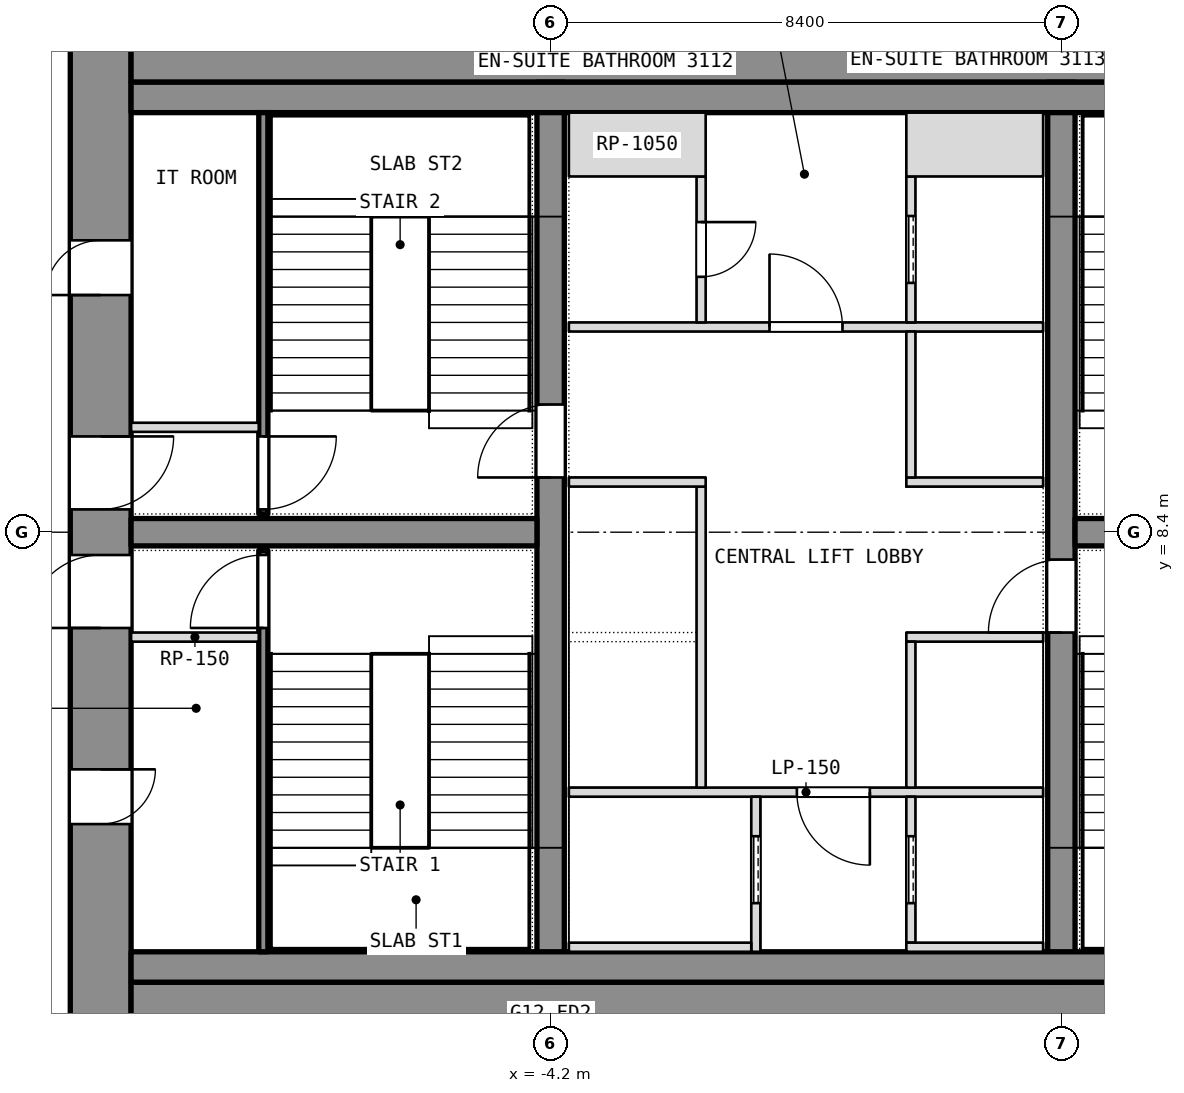
"""IFC4 building model, lengths in metres.
Left out: names, types, materials, properties, quantities, classifications, styles, units other than length and angle.
Written with IfcOpenShell. Run it as: python <this file> out.ifc"""

import sys

from ifc_helpers import new_model, si_unit, direction, frame, frame_2d, origin, place, context, subcontext, project, spatial, rectangle, extrude, element, fill, save


model = new_model("IFC4")
c1 = context("Model", 3, precision=1e-05, world=origin(), true_north=direction((0.0, 1.0)))
c2 = subcontext(c1, "Body", "Model", "MODEL_VIEW")
j1 = project(units=[si_unit("LENGTHUNIT", "METRE"), si_unit("PLANEANGLEUNIT", "RADIAN")], contexts=[c1])
p1 = place(None, origin())
s1 = spatial("IfcSite", under=j1, at=p1, CompositionType="ELEMENT")
p2 = place(p1, origin())
s2 = spatial("IfcBuilding", under=s1, at=p2, CompositionType="ELEMENT")
p3 = place(p2, frame((0.0, 0.0, 137.3)))
s3 = spatial("IfcBuildingStorey", under=s2, at=p3, CompositionType="ELEMENT", Elevation=137.3)
p4 = place(p3, frame((-11.6, 0.0, 0.0), z_axis=(0.0, 0.0, 1.0), x_axis=(0.0, 1.0, 0.0)))
e1 = element("IfcWall", 1, at=p4, inside=s3, PredefinedType="SHEAR", context=c2, shape_type="SweptSolid", body=[
    extrude(rectangle(XDim=16.8, YDim=1.0, at=frame_2d((8.4, 0.0))), origin(), (0.0, 0.0, 1.0), 3.6),
])
p5 = place(p4, frame((3.6, 0.0, 0.0)))
e2 = element("IfcOpeningElement", 2, at=p5, cuts=e1, PredefinedType="OPENING", context=c2, shape_type="SweptSolid", body=[
    extrude(rectangle(XDim=0.9, YDim=2.1, at=frame_2d((0.45, 1.05))), frame((0.0, 0.5, 0.0), z_axis=(0.0, -1.0, 0.0), x_axis=(1.0, 0.0, 0.0)), (0.0, 0.0, 1.0), 1.0),
])
p6 = place(p4, frame((6.825, 0.0, 0.0)))
e3 = element("IfcOpeningElement", 3, at=p6, cuts=e1, PredefinedType="OPENING", context=c2, shape_type="SweptSolid", body=[
    extrude(rectangle(XDim=1.2, YDim=2.1, at=frame_2d((0.6, 1.05))), frame((0.0, 0.5, 0.0), z_axis=(0.0, -1.0, 0.0), x_axis=(1.0, 0.0, 0.0)), (0.0, 0.0, 1.0), 1.0),
])
p7 = place(p4, frame((12.3, 0.0, 0.0)))
e4 = element("IfcOpeningElement", 4, at=p7, cuts=e1, PredefinedType="OPENING", context=c2, shape_type="SweptSolid", body=[
    extrude(rectangle(XDim=0.9, YDim=2.1, at=frame_2d((0.45, 1.05))), frame((0.0, 0.5, 0.0), z_axis=(0.0, -1.0, 0.0), x_axis=(1.0, 0.0, 0.0)), (0.0, 0.0, 1.0), 1.0),
])
p8 = place(p4, frame((8.775, 0.0, 0.0)))
e5 = element("IfcOpeningElement", 5, at=p8, cuts=e1, PredefinedType="OPENING", context=c2, shape_type="SweptSolid", body=[
    extrude(rectangle(XDim=1.2, YDim=2.1, at=frame_2d((0.6, 1.05))), frame((0.0, 0.5, 0.0), z_axis=(0.0, -1.0, 0.0), x_axis=(1.0, 0.0, 0.0)), (0.0, 0.0, 1.0), 1.0),
])
for number, where, z_axis, x_axis in (
    (6, (-11.1, 0.5, 0.0), (0.0, 0.0, 1.0), (1.0, 0.0, 0.0)),
    (7, (-11.1, 16.3, 0.0), (0.0, 0.0, 1.0), (1.0, 0.0, 0.0)),
):
    element("IfcWall", number, at=place(p3, frame(where, z_axis=z_axis, x_axis=x_axis)), inside=s3, PredefinedType="SHEAR", context=c2, shape_type="SweptSolid", body=[
        extrude(rectangle(XDim=22.2, YDim=1.0, at=frame_2d((11.1, 0.0))), origin(), (0.0, 0.0, 1.0), 3.6),
    ])
p9 = place(p3, frame((-4.2, 1.0, 0.0), z_axis=(0.0, 0.0, 1.0), x_axis=(0.0, 1.0, 0.0)))
e8 = element("IfcWall", 8, at=p9, inside=s3, PredefinedType="SHEAR", context=c2, shape_type="SweptSolid", body=[
    extrude(rectangle(XDim=14.8, YDim=0.45, at=frame_2d((7.4, 0.0))), origin(), (0.0, 0.0, 1.0), 3.6),
])
p10 = place(p9, frame((8.3, 0.0, 0.0)))
e9 = element("IfcOpeningElement", 9, at=p10, cuts=e8, PredefinedType="OPENING", context=c2, shape_type="SweptSolid", body=[
    extrude(rectangle(XDim=1.2, YDim=2.1, at=frame_2d((0.6, 1.05))), frame((0.0, 0.225, 0.0), z_axis=(0.0, -1.0, 0.0), x_axis=(1.0, 0.0, 0.0)), (0.0, 0.0, 1.0), 0.45),
])
p11 = place(p3, frame((4.2, 1.0, 0.0), z_axis=(0.0, 0.0, 1.0), x_axis=(0.0, 1.0, 0.0)))
e10 = element("IfcWall", 10, at=p11, inside=s3, PredefinedType="SHEAR", context=c2, shape_type="SweptSolid", body=[
    extrude(rectangle(XDim=14.8, YDim=0.45, at=frame_2d((7.4, 0.0))), origin(), (0.0, 0.0, 1.0), 3.6),
])
p12 = place(p11, frame((5.75, 0.0, 0.0)))
e11 = element("IfcOpeningElement", 11, at=p12, cuts=e10, PredefinedType="OPENING", context=c2, shape_type="SweptSolid", body=[
    extrude(rectangle(XDim=1.2, YDim=2.1, at=frame_2d((0.6, 1.05))), frame((0.0, 0.225, 0.0), z_axis=(0.0, -1.0, 0.0), x_axis=(1.0, 0.0, 0.0)), (0.0, 0.0, 1.0), 0.45),
])
for number, where, z_axis, x_axis in (
    (12, (-11.1, 8.4, 0.0), (0.0, 0.0, 1.0), (1.0, 0.0, 0.0)),
    (13, (4.425, 8.4, 0.0), (0.0, 0.0, 1.0), (1.0, 0.0, 0.0)),
):
    element("IfcWall", number, at=place(p3, frame(where, z_axis=z_axis, x_axis=x_axis)), inside=s3, PredefinedType="SHEAR", context=c2, shape_type="SweptSolid", body=[
        extrude(rectangle(XDim=6.675, YDim=0.45, at=frame_2d((3.337, 0.0))), origin(), (0.0, 0.0, 1.0), 3.6),
    ])
for number, where, z_axis, x_axis in (
    (14, (-11.1, 1.25, 0.0), (0.0, 0.0, 1.0), (1.0, 0.0, 0.0)),
    (15, (-11.1, 15.55, 0.0), (0.0, 0.0, 1.0), (1.0, 0.0, 0.0)),
):
    element("IfcWall", number, at=place(p3, frame(where, z_axis=z_axis, x_axis=x_axis)), inside=s3, PredefinedType="PARTITIONING", context=c2, shape_type="SweptSolid", body=[
        extrude(rectangle(XDim=22.2, YDim=0.5, at=frame_2d((11.1, 0.0))), origin(), (0.0, 0.0, 1.0), 3.34),
    ])
p13 = place(p3, frame((-8.925, 1.5, 0.0), z_axis=(0.0, 0.0, 1.0), x_axis=(0.0, 1.0, 0.0)))
e16 = element("IfcWall", 16, at=p13, inside=s3, PredefinedType="SHEAR", context=c2, shape_type="SweptSolid", body=[
    extrude(rectangle(XDim=6.6, YDim=0.15, at=frame_2d((3.3, 0.0))), origin(), (0.0, 0.0, 1.0), 3.34),
])
p14 = place(p13, frame((5.325, 0.0, 0.0)))
e17 = element("IfcOpeningElement", 17, at=p14, cuts=e16, PredefinedType="OPENING", context=c2, shape_type="SweptSolid", body=[
    extrude(rectangle(XDim=1.2, YDim=2.1, at=frame_2d((0.6, 1.05))), frame((0.0, 0.075, 0.0), z_axis=(0.0, -1.0, 0.0), x_axis=(1.0, 0.0, 0.0)), (0.0, 0.0, 1.0), 0.15),
])
p15 = place(p3, frame((-11.1, 6.675, 0.0), z_axis=(0.0, 0.0, 1.0), x_axis=(1.0, 0.0, 0.0)))
e18 = element("IfcWall", 18, at=p15, inside=s3, PredefinedType="PARTITIONING", context=c2, shape_type="SweptSolid", body=[
    extrude(rectangle(XDim=2.1, YDim=0.15, at=frame_2d((1.05, 0.0))), origin(), (0.0, 0.0, 1.0), 3.34),
])
p16 = place(p3, frame((-8.925, 8.7, 0.0), z_axis=(0.0, 0.0, 1.0), x_axis=(0.0, 1.0, 0.0)))
e19 = element("IfcWall", 19, at=p16, inside=s3, PredefinedType="SHEAR", context=c2, shape_type="SweptSolid", body=[
    extrude(rectangle(XDim=6.6, YDim=0.15, at=frame_2d((3.3, 0.0))), origin(), (0.0, 0.0, 1.0), 3.34),
])
p17 = place(p16, frame((0.075, 0.0, 0.0)))
e20 = element("IfcOpeningElement", 20, at=p17, cuts=e19, PredefinedType="OPENING", context=c2, shape_type="SweptSolid", body=[
    extrude(rectangle(XDim=1.2, YDim=2.1, at=frame_2d((0.6, 1.05))), frame((0.0, 0.075, 0.0), z_axis=(0.0, -1.0, 0.0), x_axis=(1.0, 0.0, 0.0)), (0.0, 0.0, 1.0), 0.15),
])
p18 = place(p3, frame((-11.1, 10.125, 0.0), z_axis=(0.0, 0.0, 1.0), x_axis=(1.0, 0.0, 0.0)))
e21 = element("IfcWall", 21, at=p18, inside=s3, PredefinedType="PARTITIONING", context=c2, shape_type="SweptSolid", body=[
    extrude(rectangle(XDim=2.1, YDim=0.15, at=frame_2d((1.05, 0.0))), origin(), (0.0, 0.0, 1.0), 3.34),
])
p19 = place(p3, frame((-3.9, 4.125, 0.0), z_axis=(0.0, 0.0, 1.0), x_axis=(1.0, 0.0, 0.0)))
e22 = element("IfcWall", 22, at=p19, inside=s3, PredefinedType="PARTITIONING", context=c2, shape_type="SweptSolid", body=[
    extrude(rectangle(XDim=7.8, YDim=0.15, at=frame_2d((3.9, 0.0))), origin(), (0.0, 0.0, 1.0), 3.34),
])
p20 = place(p19, frame((3.75, 0.0, 0.0)))
e23 = element("IfcOpeningElement", 23, at=p20, cuts=e22, PredefinedType="OPENING", context=c2, shape_type="SweptSolid", body=[
    extrude(rectangle(XDim=1.2, YDim=2.1, at=frame_2d((0.6, 1.05))), frame((0.0, 0.075, 0.0), z_axis=(0.0, -1.0, 0.0), x_axis=(1.0, 0.0, 0.0)), (0.0, 0.0, 1.0), 0.15),
])
p21 = place(p3, frame((-3.9, 11.775, 0.0), z_axis=(0.0, 0.0, 1.0), x_axis=(1.0, 0.0, 0.0)))
e24 = element("IfcWall", 24, at=p21, inside=s3, PredefinedType="PARTITIONING", context=c2, shape_type="SweptSolid", body=[
    extrude(rectangle(XDim=7.8, YDim=0.15, at=frame_2d((3.9, 0.0))), origin(), (0.0, 0.0, 1.0), 3.34),
])
p22 = place(p21, frame((3.3, 0.0, 0.0)))
e25 = element("IfcOpeningElement", 25, at=p22, cuts=e24, PredefinedType="OPENING", context=c2, shape_type="SweptSolid", body=[
    extrude(rectangle(XDim=1.2, YDim=2.1, at=frame_2d((0.6, 1.05))), frame((0.0, 0.075, 0.0), z_axis=(0.0, -1.0, 0.0), x_axis=(1.0, 0.0, 0.0)), (0.0, 0.0, 1.0), 0.15),
])
p23 = place(p3, frame((-0.825, 1.5, 0.0), z_axis=(0.0, 0.0, 1.0), x_axis=(0.0, 1.0, 0.0)))
e26 = element("IfcWall", 26, at=p23, inside=s3, PredefinedType="SHEAR", context=c2, shape_type="SweptSolid", body=[
    extrude(rectangle(XDim=2.55, YDim=0.15, at=frame_2d((1.275, 0.0))), origin(), (0.0, 0.0, 1.0), 3.6),
])
p24 = place(p23, frame((0.8, 0.0, 0.0)))
e27 = element("IfcOpeningElement", 27, at=p24, cuts=e26, PredefinedType="OPENING", context=c2, shape_type="SweptSolid", body=[
    extrude(rectangle(XDim=1.1, YDim=2.1, at=frame_2d((0.55, 1.05))), frame((0.0, 0.075, 0.0), z_axis=(0.0, -1.0, 0.0), x_axis=(1.0, 0.0, 0.0)), (0.0, 0.0, 1.0), 0.15),
])
p25 = place(p3, frame((-3.9, 1.575, 0.0), z_axis=(0.0, 0.0, 1.0), x_axis=(1.0, 0.0, 0.0)))
e28 = element("IfcWall", 28, at=p25, inside=s3, PredefinedType="SHEAR", context=c2, shape_type="SweptSolid", body=[
    extrude(rectangle(XDim=3.0, YDim=0.15, at=frame_2d((1.5, 0.0))), origin(), (0.0, 0.0, 1.0), 3.6),
])
p26 = place(p3, frame((-1.725, 4.2, 0.0), z_axis=(0.0, 0.0, 1.0), x_axis=(0.0, 1.0, 0.0)))
e29 = element("IfcWall", 29, at=p26, inside=s3, PredefinedType="SHEAR", context=c2, shape_type="SweptSolid", body=[
    extrude(rectangle(XDim=4.95, YDim=0.15, at=frame_2d((2.475, 0.0))), origin(), (0.0, 0.0, 1.0), 3.6),
])
p27 = place(p3, frame((-3.9, 9.225, 0.0), z_axis=(0.0, 0.0, 1.0), x_axis=(1.0, 0.0, 0.0)))
e30 = element("IfcWall", 30, at=p27, inside=s3, PredefinedType="SHEAR", context=c2, shape_type="SweptSolid", body=[
    extrude(rectangle(XDim=2.25, YDim=0.15, at=frame_2d((1.125, 0.0))), origin(), (0.0, 0.0, 1.0), 3.6),
])
p28 = place(p3, frame((-1.725, 11.85, 0.0), z_axis=(0.0, 0.0, 1.0), x_axis=(0.0, 1.0, 0.0)))
e31 = element("IfcWall", 31, at=p28, inside=s3, PredefinedType="PARTITIONING", context=c2, shape_type="SweptSolid", body=[
    extrude(rectangle(XDim=2.4, YDim=0.15, at=frame_2d((1.2, 0.0))), origin(), (0.0, 0.0, 1.0), 3.34),
])
p29 = place(p28, frame((0.75, 0.0, 0.0)))
e32 = element("IfcOpeningElement", 32, at=p29, cuts=e31, PredefinedType="OPENING", context=c2, shape_type="SweptSolid", body=[
    extrude(rectangle(XDim=0.9, YDim=2.1, at=frame_2d((0.45, 1.05))), frame((0.0, 0.075, 0.0), z_axis=(0.0, -1.0, 0.0), x_axis=(1.0, 0.0, 0.0)), (0.0, 0.0, 1.0), 0.15),
])
p30 = place(p3, frame((-3.9, 14.775, 0.0), z_axis=(0.0, 0.0, 1.0), x_axis=(1.0, 0.0, 0.0)))
e33 = element("IfcWall", 33, at=p30, inside=s3, PredefinedType="PARTITIONING", context=c2, shape_type="SweptSolid", body=[
    extrude(rectangle(XDim=2.25, YDim=1.05, at=frame_2d((1.125, 0.0))), origin(), (0.0, 0.0, 1.0), 3.34),
])
p31 = place(p3, frame((1.725, 1.65, 0.0), z_axis=(0.0, 0.0, 1.0), x_axis=(0.0, 1.0, 0.0)))
e34 = element("IfcWall", 34, at=p31, inside=s3, PredefinedType="SHEAR", context=c2, shape_type="SweptSolid", body=[
    extrude(rectangle(XDim=2.4, YDim=0.15, at=frame_2d((1.2, 0.0))), origin(), (0.0, 0.0, 1.0), 3.6),
])
p32 = place(p31, frame((0.65, 0.0, 0.0)))
e35 = element("IfcOpeningElement", 35, at=p32, cuts=e34, PredefinedType="OPENING", context=c2, shape_type="SweptSolid", body=[
    extrude(rectangle(XDim=1.1, YDim=2.1, at=frame_2d((0.55, 1.05))), frame((0.0, 0.075, 0.0), z_axis=(0.0, -1.0, 0.0), x_axis=(1.0, 0.0, 0.0)), (0.0, 0.0, 1.0), 0.15),
])
p33 = place(p3, frame((1.65, 1.575, 0.0), z_axis=(0.0, 0.0, 1.0), x_axis=(1.0, 0.0, 0.0)))
e36 = element("IfcWall", 36, at=p33, inside=s3, PredefinedType="SHEAR", context=c2, shape_type="SweptSolid", body=[
    extrude(rectangle(XDim=2.25, YDim=0.15, at=frame_2d((1.125, 0.0))), origin(), (0.0, 0.0, 1.0), 3.6),
])
p34 = place(p3, frame((1.725, 11.85, 0.0), z_axis=(0.0, 0.0, 1.0), x_axis=(0.0, 1.0, 0.0)))
e37 = element("IfcWall", 37, at=p34, inside=s3, PredefinedType="SHEAR", context=c2, shape_type="SweptSolid", body=[
    extrude(rectangle(XDim=2.4, YDim=0.15, at=frame_2d((1.2, 0.0))), origin(), (0.0, 0.0, 1.0), 3.6),
])
p35 = place(p34, frame((0.65, 0.0, 0.0)))
e38 = element("IfcOpeningElement", 38, at=p35, cuts=e37, PredefinedType="OPENING", context=c2, shape_type="SweptSolid", body=[
    extrude(rectangle(XDim=1.1, YDim=2.1, at=frame_2d((0.55, 1.05))), frame((0.0, 0.075, 0.0), z_axis=(0.0, -1.0, 0.0), x_axis=(1.0, 0.0, 0.0)), (0.0, 0.0, 1.0), 0.15),
])
p36 = place(p3, frame((1.65, 14.775, 0.0), z_axis=(0.0, 0.0, 1.0), x_axis=(1.0, 0.0, 0.0)))
e39 = element("IfcWall", 39, at=p36, inside=s3, PredefinedType="SHEAR", context=c2, shape_type="SweptSolid", body=[
    extrude(rectangle(XDim=2.25, YDim=1.05, at=frame_2d((1.125, 0.0))), origin(), (0.0, 0.0, 1.0), 3.6),
])
for number, where, z_axis, x_axis in (
    (40, (1.65, 6.675, 0.0), (0.0, 0.0, 1.0), (1.0, 0.0, 0.0)),
    (41, (1.65, 9.225, 0.0), (0.0, 0.0, 1.0), (1.0, 0.0, 0.0)),
):
    element("IfcWall", number, at=place(p3, frame(where, z_axis=z_axis, x_axis=x_axis)), inside=s3, PredefinedType="SHEAR", context=c2, shape_type="SweptSolid", body=[
        extrude(rectangle(XDim=2.25, YDim=0.15, at=frame_2d((1.125, 0.0))), origin(), (0.0, 0.0, 1.0), 3.6),
    ])
p37 = place(p3, frame((1.725, 4.2, 0.0), z_axis=(0.0, 0.0, 1.0), x_axis=(0.0, 1.0, 0.0)))
e42 = element("IfcWall", 42, at=p37, inside=s3, PredefinedType="SHEAR", context=c2, shape_type="SweptSolid", body=[
    extrude(rectangle(XDim=2.4, YDim=0.15, at=frame_2d((1.2, 0.0))), origin(), (0.0, 0.0, 1.0), 3.6),
])
p38 = place(p3, frame((1.725, 9.3, 0.0), z_axis=(0.0, 0.0, 1.0), x_axis=(0.0, 1.0, 0.0)))
e43 = element("IfcWall", 43, at=p38, inside=s3, PredefinedType="SHEAR", context=c2, shape_type="SweptSolid", body=[
    extrude(rectangle(XDim=2.4, YDim=0.15, at=frame_2d((1.2, 0.0))), origin(), (0.0, 0.0, 1.0), 3.6),
])
p39 = place(p5, origin())
e44 = element("IfcDoor", 44, at=p39, inside=s3, OperationType="SINGLE_SWING_LEFT", PredefinedType="DOOR", context=c2, shape_type="SweptSolid", body=[
    extrude(rectangle(XDim=0.9, YDim=2.1, at=frame_2d((0.45, 1.05))), frame((0.0, 0.025, 0.0), z_axis=(0.0, -1.0, 0.0), x_axis=(1.0, 0.0, 0.0)), (0.0, 0.0, 1.0), 0.05),
])
fill(e2, e44)
p40 = place(p6, origin())
e45 = element("IfcDoor", 45, at=p40, inside=s3, OperationType="SINGLE_SWING_LEFT", PredefinedType="DOOR", context=c2, shape_type="SweptSolid", body=[
    extrude(rectangle(XDim=1.2, YDim=2.1, at=frame_2d((0.6, 1.05))), frame((0.0, 0.025, 0.0), z_axis=(0.0, -1.0, 0.0), x_axis=(1.0, 0.0, 0.0)), (0.0, 0.0, 1.0), 0.05),
])
fill(e3, e45)
p41 = place(p14, origin())
e46 = element("IfcDoor", 46, at=p41, inside=s3, OperationType="SINGLE_SWING_LEFT", PredefinedType="DOOR", context=c2, shape_type="SweptSolid", body=[
    extrude(rectangle(XDim=1.2, YDim=2.1, at=frame_2d((0.6, 1.05))), frame((0.0, 0.025, 0.0), z_axis=(0.0, -1.0, 0.0), x_axis=(1.0, 0.0, 0.0)), (0.0, 0.0, 1.0), 0.05),
])
fill(e17, e46)
p42 = place(p7, origin())
e47 = element("IfcDoor", 47, at=p42, inside=s3, OperationType="SINGLE_SWING_LEFT", PredefinedType="DOOR", context=c2, shape_type="SweptSolid", body=[
    extrude(rectangle(XDim=0.9, YDim=2.1, at=frame_2d((0.45, 1.05))), frame((0.0, 0.025, 0.0), z_axis=(0.0, -1.0, 0.0), x_axis=(1.0, 0.0, 0.0)), (0.0, 0.0, 1.0), 0.05),
])
fill(e4, e47)
p43 = place(p8, origin())
e48 = element("IfcDoor", 48, at=p43, inside=s3, OperationType="SINGLE_SWING_LEFT", PredefinedType="DOOR", context=c2, shape_type="SweptSolid", body=[
    extrude(rectangle(XDim=1.2, YDim=2.1, at=frame_2d((0.6, 1.05))), frame((0.0, 0.025, 0.0), z_axis=(0.0, -1.0, 0.0), x_axis=(1.0, 0.0, 0.0)), (0.0, 0.0, 1.0), 0.05),
])
fill(e5, e48)
p44 = place(p17, origin())
e49 = element("IfcDoor", 49, at=p44, inside=s3, OperationType="SINGLE_SWING_LEFT", PredefinedType="DOOR", context=c2, shape_type="SweptSolid", body=[
    extrude(rectangle(XDim=1.2, YDim=2.1, at=frame_2d((0.6, 1.05))), frame((0.0, 0.025, 0.0), z_axis=(0.0, -1.0, 0.0), x_axis=(1.0, 0.0, 0.0)), (0.0, 0.0, 1.0), 0.05),
])
fill(e20, e49)
p45 = place(p24, origin())
e50 = element("IfcDoor", 50, at=p45, inside=s3, OperationType="SLIDING_TO_LEFT", PredefinedType="DOOR", context=c2, shape_type="SweptSolid", body=[
    extrude(rectangle(XDim=1.1, YDim=2.1, at=frame_2d((0.55, 1.05))), frame((0.0, 0.025, 0.0), z_axis=(0.0, -1.0, 0.0), x_axis=(1.0, 0.0, 0.0)), (0.0, 0.0, 1.0), 0.05),
])
fill(e27, e50)
p46 = place(p32, origin())
e51 = element("IfcDoor", 51, at=p46, inside=s3, OperationType="SLIDING_TO_LEFT", PredefinedType="DOOR", context=c2, shape_type="SweptSolid", body=[
    extrude(rectangle(XDim=1.1, YDim=2.1, at=frame_2d((0.55, 1.05))), frame((0.0, 0.025, 0.0), z_axis=(0.0, -1.0, 0.0), x_axis=(1.0, 0.0, 0.0)), (0.0, 0.0, 1.0), 0.05),
])
fill(e35, e51)
p47 = place(p35, origin())
e52 = element("IfcDoor", 52, at=p47, inside=s3, OperationType="SLIDING_TO_LEFT", PredefinedType="DOOR", context=c2, shape_type="SweptSolid", body=[
    extrude(rectangle(XDim=1.1, YDim=2.1, at=frame_2d((0.55, 1.05))), frame((0.0, 0.025, 0.0), z_axis=(0.0, -1.0, 0.0), x_axis=(1.0, 0.0, 0.0)), (0.0, 0.0, 1.0), 0.05),
])
fill(e38, e52)
p48 = place(p20, origin())
e53 = element("IfcDoor", 53, at=p48, inside=s3, OperationType="SINGLE_SWING_LEFT", PredefinedType="DOOR", context=c2, shape_type="SweptSolid", body=[
    extrude(rectangle(XDim=1.2, YDim=2.1, at=frame_2d((0.6, 1.05))), frame((0.0, 0.025, 0.0), z_axis=(0.0, -1.0, 0.0), x_axis=(1.0, 0.0, 0.0)), (0.0, 0.0, 1.0), 0.05),
])
fill(e23, e53)
p49 = place(p22, origin())
e54 = element("IfcDoor", 54, at=p49, inside=s3, OperationType="SINGLE_SWING_LEFT", PredefinedType="DOOR", context=c2, shape_type="SweptSolid", body=[
    extrude(rectangle(XDim=1.2, YDim=2.1, at=frame_2d((0.6, 1.05))), frame((0.0, 0.025, 0.0), z_axis=(0.0, -1.0, 0.0), x_axis=(1.0, 0.0, 0.0)), (0.0, 0.0, 1.0), 0.05),
])
fill(e25, e54)
p50 = place(p29, origin())
e55 = element("IfcDoor", 55, at=p50, inside=s3, OperationType="SINGLE_SWING_LEFT", PredefinedType="DOOR", context=c2, shape_type="SweptSolid", body=[
    extrude(rectangle(XDim=0.9, YDim=2.1, at=frame_2d((0.45, 1.05))), frame((0.0, 0.025, 0.0), z_axis=(0.0, -1.0, 0.0), x_axis=(1.0, 0.0, 0.0)), (0.0, 0.0, 1.0), 0.05),
])
fill(e32, e55)
p51 = place(p10, origin())
e56 = element("IfcDoor", 56, at=p51, inside=s3, OperationType="SINGLE_SWING_LEFT", PredefinedType="DOOR", context=c2, shape_type="SweptSolid", body=[
    extrude(rectangle(XDim=1.2, YDim=2.1, at=frame_2d((0.6, 1.05))), frame((0.0, 0.025, 0.0), z_axis=(0.0, -1.0, 0.0), x_axis=(1.0, 0.0, 0.0)), (0.0, 0.0, 1.0), 0.05),
])
fill(e9, e56)
p52 = place(p12, origin())
e57 = element("IfcDoor", 57, at=p52, inside=s3, OperationType="SINGLE_SWING_LEFT", PredefinedType="DOOR", context=c2, shape_type="SweptSolid", body=[
    extrude(rectangle(XDim=1.2, YDim=2.1, at=frame_2d((0.6, 1.05))), frame((0.0, 0.025, 0.0), z_axis=(0.0, -1.0, 0.0), x_axis=(1.0, 0.0, 0.0)), (0.0, 0.0, 1.0), 0.05),
])
fill(e11, e57)
save(model, sys.argv[1])
